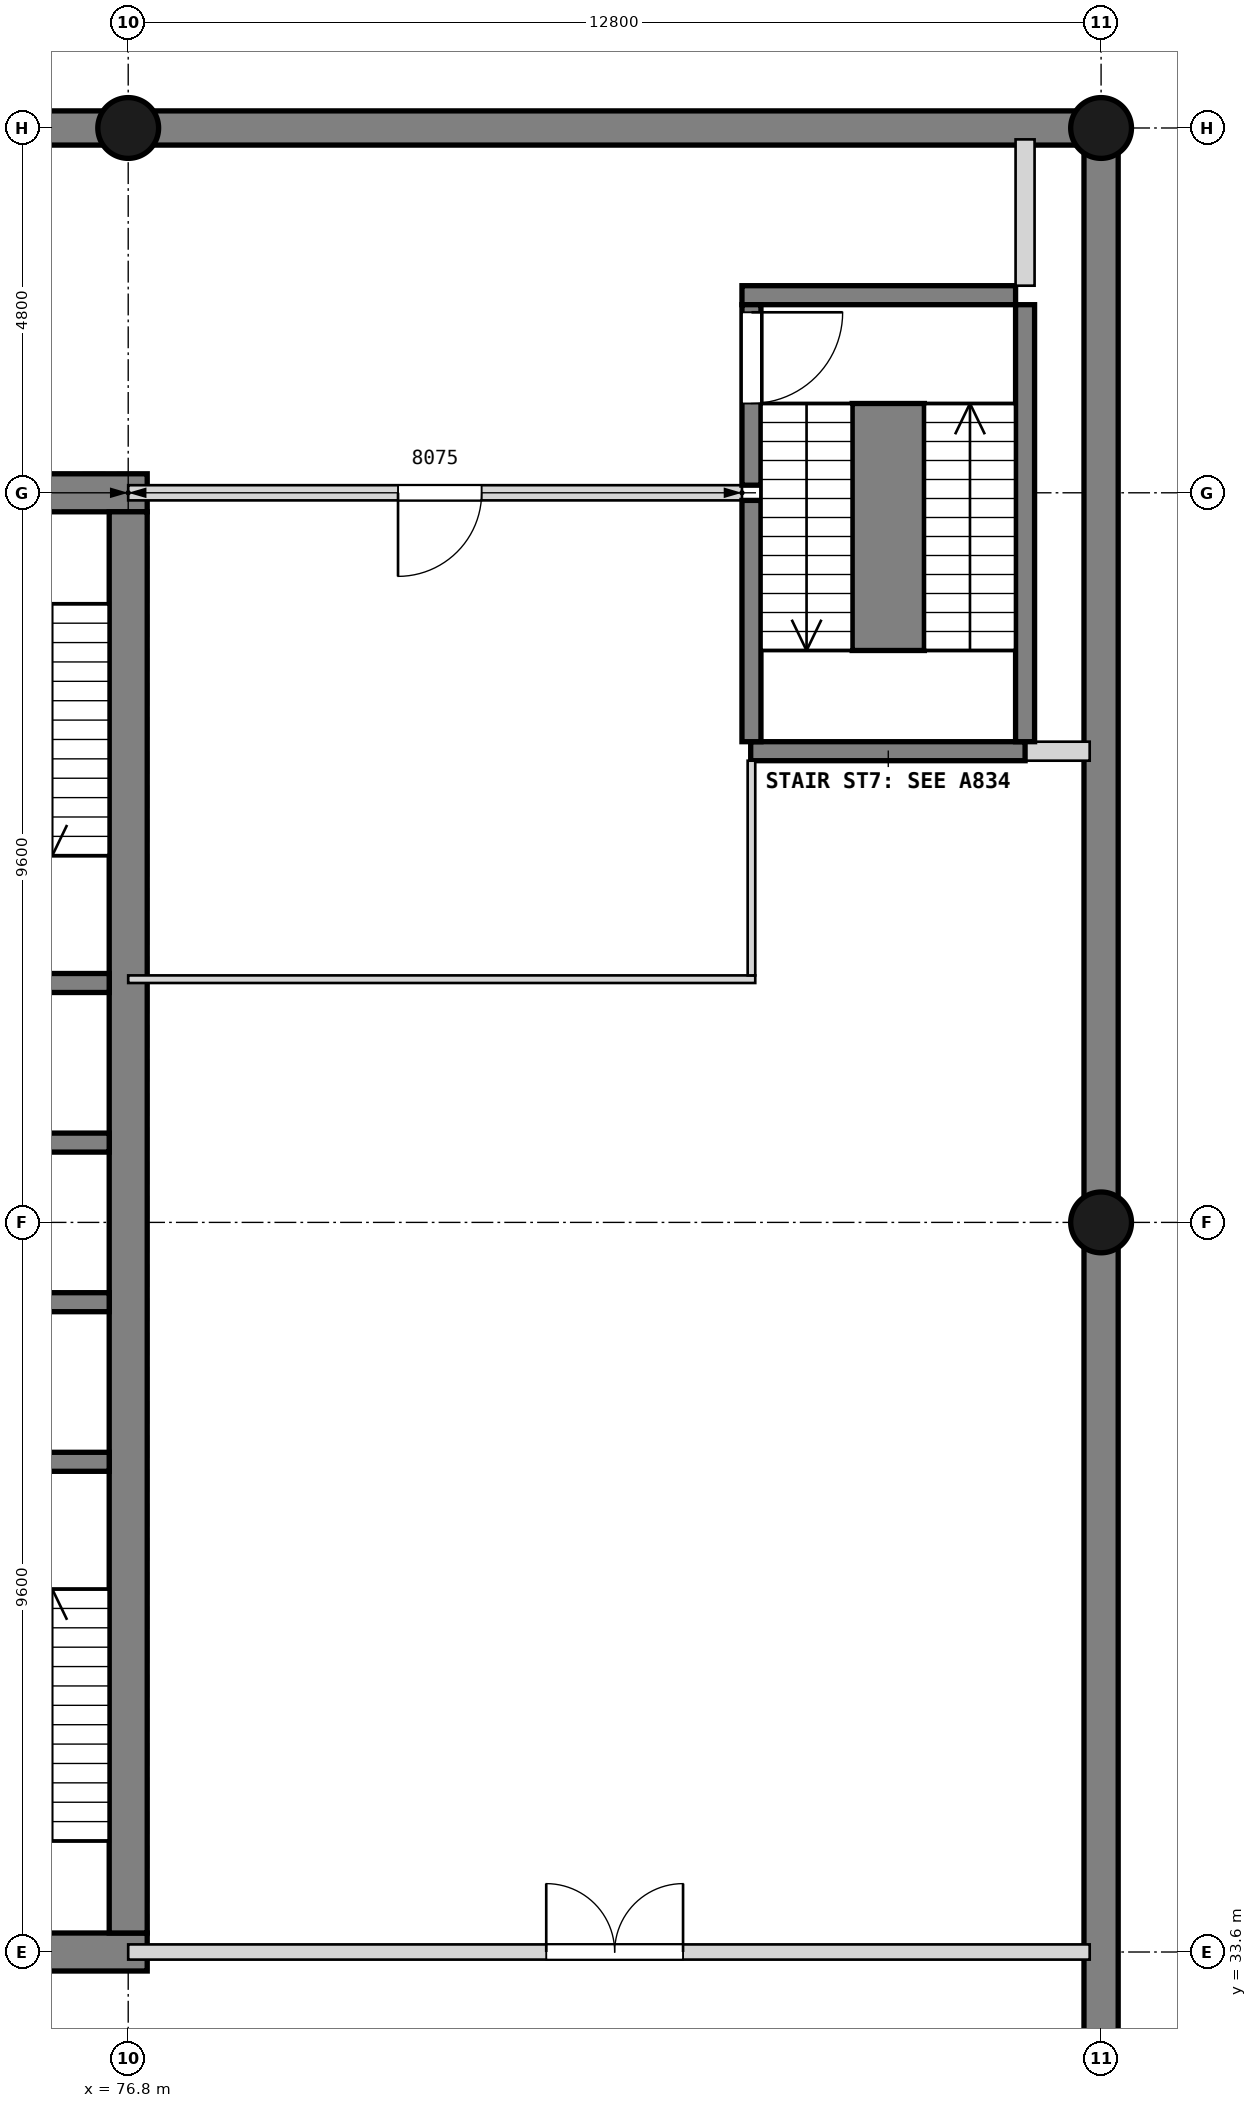
"""IFC4 building model, lengths in metres.
Left out: names, types, materials, properties, quantities, classifications, styles, units other than length and angle.
Written with IfcOpenShell. Run it as: python <this file> out.ifc"""

import sys

from ifc_helpers import new_model, si_unit, direction, frame, frame_2d, origin, origin_2d, place, context, subcontext, project, spatial, rectangle, circle, extrude, element, fill, save


model = new_model("IFC4")
c1 = context("Model", 3, precision=1e-05, world=origin(), true_north=direction((0.0, 1.0)))
c2 = subcontext(c1, "Body", "Model", "MODEL_VIEW")
j1 = project(units=[si_unit("LENGTHUNIT", "METRE"), si_unit("PLANEANGLEUNIT", "RADIAN")], contexts=[c1])
p1 = place(None, origin())
s1 = spatial("IfcSite", under=j1, at=p1, CompositionType="ELEMENT")
p2 = place(p1, origin())
s2 = spatial("IfcBuilding", under=s1, at=p2, CompositionType="ELEMENT")
p3 = place(p2, frame((0.0, 0.0, -4.8)))
s3 = spatial("IfcBuildingStorey", under=s2, at=p3, CompositionType="ELEMENT", Elevation=-4.8)
p4 = place(p3, frame((63.75, 52.8, 0.0), z_axis=(0.0, 0.0, 1.0), x_axis=(1.0, 0.0, 0.0)))
e1 = element("IfcWall", 1, at=p4, inside=s3, PredefinedType="SHEAR", context=c2, shape_type="SweptSolid", body=[
    extrude(rectangle(XDim=13.3, YDim=0.5, at=frame_2d((6.65, 0.0))), origin(), (0.0, 0.0, 1.0), 4.8),
])
p5 = place(p4, frame((6.65, 0.0, 0.0)))
e2 = element("IfcOpeningElement", 2, at=p5, cuts=e1, PredefinedType="OPENING", context=c2, shape_type="SweptSolid", body=[
    extrude(rectangle(XDim=2.0, YDim=2.1, at=frame_2d((1.0, 1.05))), frame((0.0, 0.26, 0.0), z_axis=(0.0, -1.0, 0.0), x_axis=(1.0, 0.0, 0.0)), (0.0, 0.0, 1.0), 0.52),
])
p6 = place(p3, frame((63.75, 33.6, 0.0), z_axis=(0.0, 0.0, 1.0), x_axis=(1.0, 0.0, 0.0)))
e3 = element("IfcWall", 3, at=p6, inside=s3, PredefinedType="SHEAR", context=c2, shape_type="SweptSolid", body=[
    extrude(rectangle(XDim=13.3, YDim=0.5, at=frame_2d((6.65, 0.0))), origin(), (0.0, 0.0, 1.0), 4.8),
])
p7 = place(p6, frame((6.65, 0.0, 0.0)))
e4 = element("IfcOpeningElement", 4, at=p7, cuts=e3, PredefinedType="OPENING", context=c2, shape_type="SweptSolid", body=[
    extrude(rectangle(XDim=2.0, YDim=2.1, at=frame_2d((1.0, 1.05))), frame((0.0, 0.26, 0.0), z_axis=(0.0, -1.0, 0.0), x_axis=(1.0, 0.0, 0.0)), (0.0, 0.0, 1.0), 0.52),
])
p8 = place(p3, frame((76.8, 33.85, 0.0), z_axis=(0.0, 0.0, 1.0), x_axis=(0.0, 1.0, 0.0)))
e5 = element("IfcWall", 5, at=p8, inside=s3, PredefinedType="SHEAR", context=c2, shape_type="SweptSolid", body=[
    extrude(rectangle(XDim=18.7, YDim=0.5, at=frame_2d((9.35, 0.0))), origin(), (0.0, 0.0, 1.0), 4.8),
])
p9 = place(p3, frame((89.6, -0.225, 0.0), z_axis=(0.0, 0.0, 1.0), x_axis=(0.0, 1.0, 0.0)))
e6 = element("IfcWall", 6, at=p9, inside=s3, PredefinedType="SOLIDWALL", context=c2, shape_type="SweptSolid", body=[
    extrude(rectangle(XDim=58.05, YDim=0.45, at=frame_2d((29.025, 0.0))), origin(), (0.0, 0.0, 1.0), 4.8),
])
p10 = place(p3, frame((89.375, 57.6, 0.0), z_axis=(0.0, 0.0, 1.0), x_axis=(-1.0, 0.0, 0.0)))
e7 = element("IfcWall", 7, at=p10, inside=s3, PredefinedType="SOLIDWALL", context=c2, shape_type="SweptSolid", body=[
    extrude(rectangle(XDim=25.15, YDim=0.45, at=frame_2d((12.575, 0.0))), origin(), (0.0, 0.0, 1.0), 4.8),
])
for number, where, z_axis, x_axis in (
    (8, (89.6, 43.2, 0.0), (0.0, 0.0, 1.0), (1.0, 0.0, 0.0)),
    (9, (89.6, 57.6, 0.0), (0.0, 0.0, 1.0), (1.0, 0.0, 0.0)),
    (10, (76.8, 57.6, 0.0), (0.0, 0.0, 1.0), (1.0, 0.0, 0.0)),
):
    element("IfcColumn", number, at=place(p3, frame(where, z_axis=z_axis, x_axis=x_axis)), inside=s3, PredefinedType="COLUMN", context=c2, shape_type="SweptSolid", body=[
        extrude(circle(Radius=0.4, at=origin_2d()), origin(), (0.0, 0.0, 1.0), 4.8),
    ])
for number, where, z_axis, x_axis in (
    (11, (76.55, 40.05, 0.0), (0.0, 0.0, 1.0), (-1.0, 0.0, 0.0)),
    (12, (76.55, 42.15, 0.0), (0.0, 0.0, 1.0), (-1.0, 0.0, 0.0)),
    (13, (76.55, 44.25, 0.0), (0.0, 0.0, 1.0), (-1.0, 0.0, 0.0)),
    (14, (76.55, 46.35, 0.0), (0.0, 0.0, 1.0), (-1.0, 0.0, 0.0)),
):
    element("IfcWall", number, at=place(p3, frame(where, z_axis=z_axis, x_axis=x_axis)), inside=s3, PredefinedType="SOLIDWALL", context=c2, shape_type="SweptSolid", body=[
        extrude(rectangle(XDim=3.475, YDim=0.25, at=frame_2d((1.738, 0.0))), origin(), (0.0, 0.0, 1.0), 4.5),
    ])
p11 = place(p3, frame((89.45, 33.6, 0.0), z_axis=(0.0, 0.0, 1.0), x_axis=(-1.0, 0.0, 0.0)))
e15 = element("IfcWall", 15, at=p11, inside=s3, PredefinedType="PARTITIONING", context=c2, shape_type="SweptSolid", body=[
    extrude(rectangle(XDim=12.65, YDim=0.2, at=frame_2d((6.325, 0.0))), origin(), (0.0, 0.0, 1.0), 4.5),
])
p12 = place(p11, frame((5.35, 0.0, 0.0)))
e16 = element("IfcOpeningElement", 16, at=p12, cuts=e15, PredefinedType="OPENING", context=c2, shape_type="SweptSolid", body=[
    extrude(rectangle(XDim=1.8, YDim=2.1, at=frame_2d((0.9, 1.05))), frame((0.0, 0.11, 0.0), z_axis=(0.0, -1.0, 0.0), x_axis=(1.0, 0.0, 0.0)), (0.0, 0.0, 1.0), 0.22),
])
p13 = place(p3, frame((85.05, 46.4, 0.0), z_axis=(0.0, 0.0, 1.0), x_axis=(-1.0, 0.0, 0.0)))
e17 = element("IfcWall", 17, at=p13, inside=s3, PredefinedType="PARTITIONING", context=c2, shape_type="SweptSolid", body=[
    extrude(rectangle(XDim=8.25, YDim=0.1, at=frame_2d((4.125, 0.0))), origin(), (0.0, 0.0, 1.0), 4.5),
])
p14 = place(p3, frame((89.45, 49.4, 0.0), z_axis=(0.0, 0.0, 1.0), x_axis=(-1.0, 0.0, 0.0)))
e18 = element("IfcWall", 18, at=p14, inside=s3, PredefinedType="PARTITIONING", context=c2, shape_type="SweptSolid", body=[
    extrude(rectangle(XDim=0.85, YDim=0.25, at=frame_2d((0.425, 0.0))), origin(), (0.0, 0.0, 1.0), 4.5),
])
p15 = place(p3, frame((88.6, 49.4, 0.0), z_axis=(0.0, 0.0, 1.0), x_axis=(-1.0, 0.0, 0.0)))
e19 = element("IfcWall", 19, at=p15, inside=s3, PredefinedType="SHEAR", context=c2, shape_type="SweptSolid", body=[
    extrude(rectangle(XDim=3.61, YDim=0.25, at=frame_2d((1.805, 0.0))), origin(), (0.0, 0.0, 1.0), 4.5),
])
p16 = place(p3, frame((84.875, 52.8, 0.0), z_axis=(0.0, 0.0, 1.0), x_axis=(-1.0, 0.0, 0.0)))
e20 = element("IfcWall", 20, at=p16, inside=s3, PredefinedType="PARTITIONING", context=c2, shape_type="SweptSolid", body=[
    extrude(rectangle(XDim=8.075, YDim=0.2, at=frame_2d((4.038, 0.0))), origin(), (0.0, 0.0, 1.0), 4.5),
])
p17 = place(p16, frame((3.425, 0.0, 0.0)))
e21 = element("IfcOpeningElement", 21, at=p17, cuts=e20, PredefinedType="OPENING", context=c2, shape_type="SweptSolid", body=[
    extrude(rectangle(XDim=1.1, YDim=2.1, at=frame_2d((0.55, 1.05))), frame((0.0, 0.11, 0.0), z_axis=(0.0, -1.0, 0.0), x_axis=(1.0, 0.0, 0.0)), (0.0, 0.0, 1.0), 0.22),
])
p18 = place(p3, frame((88.475, 55.4, 0.0), z_axis=(0.0, 0.0, 1.0), x_axis=(-1.0, 0.0, 0.0)))
e22 = element("IfcWall", 22, at=p18, inside=s3, PredefinedType="SHEAR", context=c2, shape_type="SweptSolid", body=[
    extrude(rectangle(XDim=3.6, YDim=0.25, at=frame_2d((1.8, 0.0))), origin(), (0.0, 0.0, 1.0), 4.5),
])
p19 = place(p3, frame((88.6, 49.525, 0.0), z_axis=(0.0, 0.0, 1.0), x_axis=(0.0, 1.0, 0.0)))
e23 = element("IfcWall", 23, at=p19, inside=s3, PredefinedType="SHEAR", context=c2, shape_type="SweptSolid", body=[
    extrude(rectangle(XDim=5.75, YDim=0.25, at=frame_2d((2.875, 0.0))), origin(), (0.0, 0.0, 1.0), 4.5),
])
p20 = place(p3, frame((88.6, 55.525, 0.0), z_axis=(0.0, 0.0, 1.0), x_axis=(0.0, 1.0, 0.0)))
e24 = element("IfcWall", 24, at=p20, inside=s3, PredefinedType="PARTITIONING", context=c2, shape_type="SweptSolid", body=[
    extrude(rectangle(XDim=1.925, YDim=0.25, at=frame_2d((0.962, 0.0))), origin(), (0.0, 0.0, 1.0), 4.5),
])
p21 = place(p3, frame((85.0, 46.45, 0.0), z_axis=(0.0, 0.0, 1.0), x_axis=(0.0, 1.0, 0.0)))
e25 = element("IfcWall", 25, at=p21, inside=s3, PredefinedType="PARTITIONING", context=c2, shape_type="SweptSolid", body=[
    extrude(rectangle(XDim=2.825, YDim=0.1, at=frame_2d((1.413, 0.0))), origin(), (0.0, 0.0, 1.0), 4.5),
])
p22 = place(p3, frame((85.0, 49.525, 0.0), z_axis=(0.0, 0.0, 1.0), x_axis=(0.0, 1.0, 0.0)))
e26 = element("IfcWall", 26, at=p22, inside=s3, PredefinedType="SHEAR", context=c2, shape_type="SweptSolid", body=[
    extrude(rectangle(XDim=3.175, YDim=0.25, at=frame_2d((1.587, 0.0))), origin(), (0.0, 0.0, 1.0), 4.5),
])
p23 = place(p3, frame((85.0, 52.9, 0.0), z_axis=(0.0, 0.0, 1.0), x_axis=(0.0, 1.0, 0.0)))
e27 = element("IfcWall", 27, at=p23, inside=s3, PredefinedType="SHEAR", context=c2, shape_type="SweptSolid", body=[
    extrude(rectangle(XDim=2.375, YDim=0.25, at=frame_2d((1.188, 0.0))), origin(), (0.0, 0.0, 1.0), 4.5),
])
p24 = place(p23, frame((1.075, 0.0, 0.0)))
e28 = element("IfcOpeningElement", 28, at=p24, cuts=e27, PredefinedType="OPENING", context=c2, shape_type="SweptSolid", body=[
    extrude(rectangle(XDim=1.2, YDim=2.1, at=frame_2d((0.6, 1.05))), frame((0.0, 0.135, 0.0), z_axis=(0.0, -1.0, 0.0), x_axis=(1.0, 0.0, 0.0)), (0.0, 0.0, 1.0), 0.27),
])
p25 = place(p3, frame((86.8, 53.975, 0.0), z_axis=(0.0, 0.0, 1.0), x_axis=(0.0, -1.0, 0.0)))
e29 = element("IfcWall", 29, at=p25, inside=s3, PredefinedType="SHEAR", context=c2, shape_type="SweptSolid", body=[
    extrude(rectangle(XDim=3.25, YDim=0.95, at=frame_2d((1.625, 0.0))), origin(), (0.0, 0.0, 1.0), 4.8),
])
p26 = place(p12, frame((1.8, 0.0, 0.0), z_axis=(0.0, 0.0, 1.0), x_axis=(-1.0, 0.0, 0.0)))
e30 = element("IfcDoor", 30, at=p26, inside=s3, OperationType="DOUBLE_DOOR_SINGLE_SWING", PredefinedType="DOOR", context=c2, shape_type="SweptSolid", body=[
    extrude(rectangle(XDim=1.8, YDim=2.1, at=frame_2d((0.9, 1.05))), frame((0.0, 0.025, 0.0), z_axis=(0.0, -1.0, 0.0), x_axis=(1.0, 0.0, 0.0)), (0.0, 0.0, 1.0), 0.05),
])
fill(e16, e30)
p27 = place(p17, origin())
e31 = element("IfcDoor", 31, at=p27, inside=s3, OperationType="SINGLE_SWING_RIGHT", PredefinedType="DOOR", context=c2, shape_type="SweptSolid", body=[
    extrude(rectangle(XDim=1.1, YDim=2.1, at=frame_2d((0.55, 1.05))), frame((0.0, 0.025, 0.0), z_axis=(0.0, -1.0, 0.0), x_axis=(1.0, 0.0, 0.0)), (0.0, 0.0, 1.0), 0.05),
])
fill(e21, e31)
p28 = place(p24, frame((1.2, 0.0, 0.0), z_axis=(0.0, 0.0, 1.0), x_axis=(-1.0, 0.0, 0.0)))
e32 = element("IfcDoor", 32, at=p28, inside=s3, OperationType="SINGLE_SWING_LEFT", PredefinedType="DOOR", context=c2, shape_type="SweptSolid", body=[
    extrude(rectangle(XDim=1.2, YDim=2.1, at=frame_2d((0.6, 1.05))), frame((0.0, 0.025, 0.0), z_axis=(0.0, -1.0, 0.0), x_axis=(1.0, 0.0, 0.0)), (0.0, 0.0, 1.0), 0.05),
])
fill(e28, e32)
save(model, sys.argv[1])
